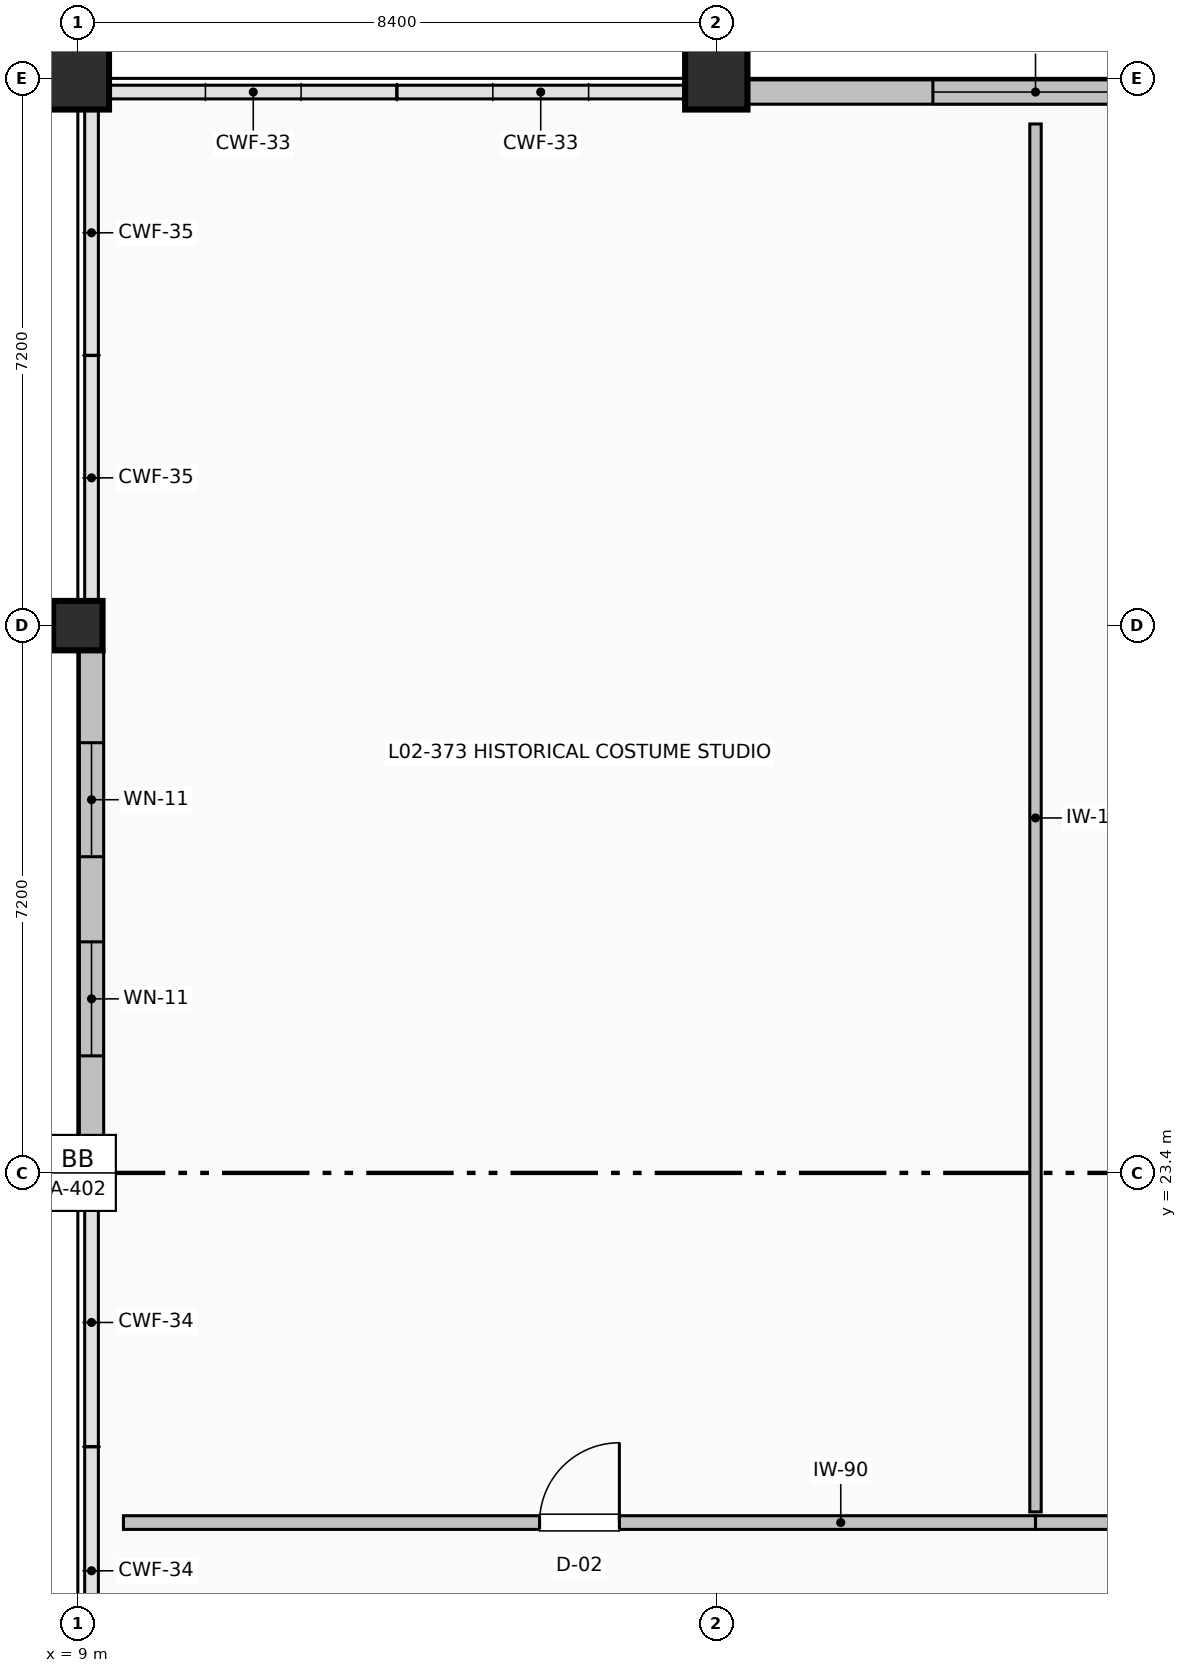
"""IFC4 building model, lengths in metres.
Left out: names, types, materials, properties, quantities, classifications, styles, units other than length and angle.
Written with IfcOpenShell. Run it as: python <this file> out.ifc"""

import sys

from ifc_helpers import new_model, si_unit, direction, frame, frame_2d, origin, origin_2d, place, context, subcontext, project, spatial, rectangle, extrude, element, fill, save


model = new_model("IFC4")
c1 = context("Model", 3, precision=1e-05, world=origin(), true_north=direction((0.0, 1.0)))
c2 = subcontext(c1, "Body", "Model", "MODEL_VIEW")
j1 = project(units=[si_unit("LENGTHUNIT", "METRE"), si_unit("PLANEANGLEUNIT", "RADIAN")], contexts=[c1])
p1 = place(None, origin())
s1 = spatial("IfcSite", under=j1, at=p1, CompositionType="ELEMENT")
p2 = place(p1, origin())
s2 = spatial("IfcBuilding", under=s1, at=p2, CompositionType="ELEMENT")
p3 = place(p2, frame((0.0, 0.0, 10.2)))
s3 = spatial("IfcBuildingStorey", under=s2, at=p3, CompositionType="ELEMENT", Elevation=10.2)
for number, where, z_axis, x_axis in (
    (1, (9.0, 23.4, 0.0), (0.0, 0.0, 1.0), (1.0, 0.0, 0.0)),
    (2, (9.0, 30.6, 0.0), (0.0, 0.0, 1.0), (1.0, 0.0, 0.0)),
):
    element("IfcColumn", number, at=place(p3, frame(where, z_axis=z_axis, x_axis=x_axis)), inside=s3, PredefinedType="COLUMN", context=c2, shape_type="SweptSolid", body=[
        extrude(rectangle(XDim=0.65, YDim=0.65, at=origin_2d()), origin(), (0.0, 0.0, 1.0), 4.8),
    ])
for number, where, z_axis, x_axis in (
    (3, (9.0, 37.8, 0.0), (0.0, 0.0, 1.0), (1.0, 0.0, 0.0)),
    (4, (17.4, 37.8, 0.0), (0.0, 0.0, 1.0), (1.0, 0.0, 0.0)),
):
    element("IfcColumn", number, at=place(p3, frame(where, z_axis=z_axis, x_axis=x_axis)), inside=s3, PredefinedType="COLUMN", context=c2, shape_type="SweptSolid", body=[
        extrude(rectangle(XDim=0.82, YDim=0.82, at=origin_2d()), origin(), (0.0, 0.0, 1.0), 4.8),
    ])
p4 = place(p3, frame((17.81, 37.62, 0.0), z_axis=(0.0, 0.0, 1.0), x_axis=(1.0, 0.0, 0.0)))
e5 = element("IfcWall", 5, at=p4, inside=s3, PredefinedType="SOLIDWALL", context=c2, shape_type="SweptSolid", body=[
    extrude(rectangle(XDim=7.58, YDim=0.32, at=frame_2d((3.79, 0.0))), origin(), (0.0, 0.0, 1.0), 3.722),
])
p5 = place(p4, frame((2.44, 0.0, 0.95)))
e6 = element("IfcOpeningElement", 6, at=p5, cuts=e5, PredefinedType="OPENING", context=c2, shape_type="SweptSolid", body=[
    extrude(rectangle(XDim=2.7, YDim=1.9, at=frame_2d((1.35, 0.95))), frame((0.0, 0.17, 0.0), z_axis=(0.0, -1.0, 0.0), x_axis=(1.0, 0.0, 0.0)), (0.0, 0.0, 1.0), 0.34),
])
p6 = place(p3, frame((9.18, 23.725, 0.0), z_axis=(0.0, 0.0, 1.0), x_axis=(0.0, 1.0, 0.0)))
e7 = element("IfcWall", 7, at=p6, inside=s3, PredefinedType="SOLIDWALL", context=c2, shape_type="SweptSolid", body=[
    extrude(rectangle(XDim=6.55, YDim=0.32, at=frame_2d((3.275, 0.0))), origin(), (0.0, 0.0, 1.0), 3.822),
])
p7 = place(p6, frame((1.215, 0.0, 0.95)))
e8 = element("IfcOpeningElement", 8, at=p7, cuts=e7, PredefinedType="OPENING", context=c2, shape_type="SweptSolid", body=[
    extrude(rectangle(XDim=1.5, YDim=1.9, at=frame_2d((0.75, 0.95))), frame((0.0, 0.17, 0.0), z_axis=(0.0, -1.0, 0.0), x_axis=(1.0, 0.0, 0.0)), (0.0, 0.0, 1.0), 0.34),
])
p8 = place(p6, frame((3.835, 0.0, 0.95)))
e9 = element("IfcOpeningElement", 9, at=p8, cuts=e7, PredefinedType="OPENING", context=c2, shape_type="SweptSolid", body=[
    extrude(rectangle(XDim=1.5, YDim=1.9, at=frame_2d((0.75, 0.95))), frame((0.0, 0.17, 0.0), z_axis=(0.0, -1.0, 0.0), x_axis=(1.0, 0.0, 0.0)), (0.0, 0.0, 1.0), 0.34),
])
p9 = place(p3, frame((9.6, 18.8, 0.0), z_axis=(0.0, 0.0, 1.0), x_axis=(1.0, 0.0, 0.0)))
e10 = element("IfcWall", 10, at=p9, inside=s3, PredefinedType="PARTITIONING", context=c2, shape_type="SweptSolid", body=[
    extrude(rectangle(XDim=12.0, YDim=0.18, at=frame_2d((6.0, 0.0))), origin(), (0.0, 0.0, 1.0), 4.492),
])
p10 = place(p9, frame((5.475, 0.0, 0.0)))
e11 = element("IfcOpeningElement", 11, at=p10, cuts=e10, PredefinedType="OPENING", context=c2, shape_type="SweptSolid", body=[
    extrude(rectangle(XDim=1.05, YDim=2.1, at=frame_2d((0.525, 1.05))), frame((0.0, 0.1, 0.0), z_axis=(0.0, -1.0, 0.0), x_axis=(1.0, 0.0, 0.0)), (0.0, 0.0, 1.0), 0.2),
])
p11 = place(p3, frame((21.6, 18.94, 0.0), z_axis=(0.0, 0.0, 1.0), x_axis=(0.0, 1.0, 0.0)))
e12 = element("IfcWall", 12, at=p11, inside=s3, PredefinedType="PARTITIONING", context=c2, shape_type="SweptSolid", body=[
    extrude(rectangle(XDim=18.26, YDim=0.15, at=frame_2d((9.13, 0.0))), origin(), (0.0, 0.0, 1.0), 4.492),
])
p12 = place(p3, frame((21.6, 18.8, 0.0), z_axis=(0.0, 0.0, 1.0), x_axis=(1.0, 0.0, 0.0)))
e13 = element("IfcWall", 13, at=p12, inside=s3, PredefinedType="PARTITIONING", context=c2, shape_type="SweptSolid", body=[
    extrude(rectangle(XDim=12.0, YDim=0.18, at=frame_2d((6.0, 0.0))), origin(), (0.0, 0.0, 1.0), 4.492),
])
p13 = place(p12, frame((5.44, 0.0, 0.0)))
e14 = element("IfcOpeningElement", 14, at=p13, cuts=e13, PredefinedType="OPENING", context=c2, shape_type="SweptSolid", body=[
    extrude(rectangle(XDim=1.12, YDim=2.12, at=frame_2d((0.56, 1.06))), frame((0.0, 0.1, 0.0), z_axis=(0.0, -1.0, 0.0), x_axis=(1.0, 0.0, 0.0)), (0.0, 0.0, 1.0), 0.2),
])
p14 = place(p5, origin())
e15 = element("IfcWindow", 15, at=p14, inside=s3, PartitioningType="SINGLE_PANEL", PredefinedType="WINDOW", context=c2, shape_type="SweptSolid", body=[
    extrude(rectangle(XDim=2.7, YDim=1.9, at=frame_2d((1.35, 0.95))), frame((0.0, 0.03, 0.0), z_axis=(0.0, -1.0, 0.0), x_axis=(1.0, 0.0, 0.0)), (0.0, 0.0, 1.0), 0.06),
])
fill(e6, e15)
p15 = place(p7, origin())
e16 = element("IfcWindow", 16, at=p15, inside=s3, PartitioningType="SINGLE_PANEL", PredefinedType="WINDOW", context=c2, shape_type="SweptSolid", body=[
    extrude(rectangle(XDim=1.5, YDim=1.9, at=frame_2d((0.75, 0.95))), frame((0.0, 0.03, 0.0), z_axis=(0.0, -1.0, 0.0), x_axis=(1.0, 0.0, 0.0)), (0.0, 0.0, 1.0), 0.06),
])
fill(e8, e16)
p16 = place(p8, origin())
e17 = element("IfcWindow", 17, at=p16, inside=s3, PartitioningType="SINGLE_PANEL", PredefinedType="WINDOW", context=c2, shape_type="SweptSolid", body=[
    extrude(rectangle(XDim=1.5, YDim=1.9, at=frame_2d((0.75, 0.95))), frame((0.0, 0.03, 0.0), z_axis=(0.0, -1.0, 0.0), x_axis=(1.0, 0.0, 0.0)), (0.0, 0.0, 1.0), 0.06),
])
fill(e9, e17)
p17 = place(p10, origin())
e18 = element("IfcDoor", 18, at=p17, inside=s3, OperationType="SINGLE_SWING_RIGHT", PredefinedType="DOOR", context=c2, shape_type="SweptSolid", body=[
    extrude(rectangle(XDim=1.05, YDim=2.1, at=frame_2d((0.525, 1.05))), frame((0.0, 0.025, 0.0), z_axis=(0.0, -1.0, 0.0), x_axis=(1.0, 0.0, 0.0)), (0.0, 0.0, 1.0), 0.05),
])
fill(e11, e18)
save(model, sys.argv[1])
